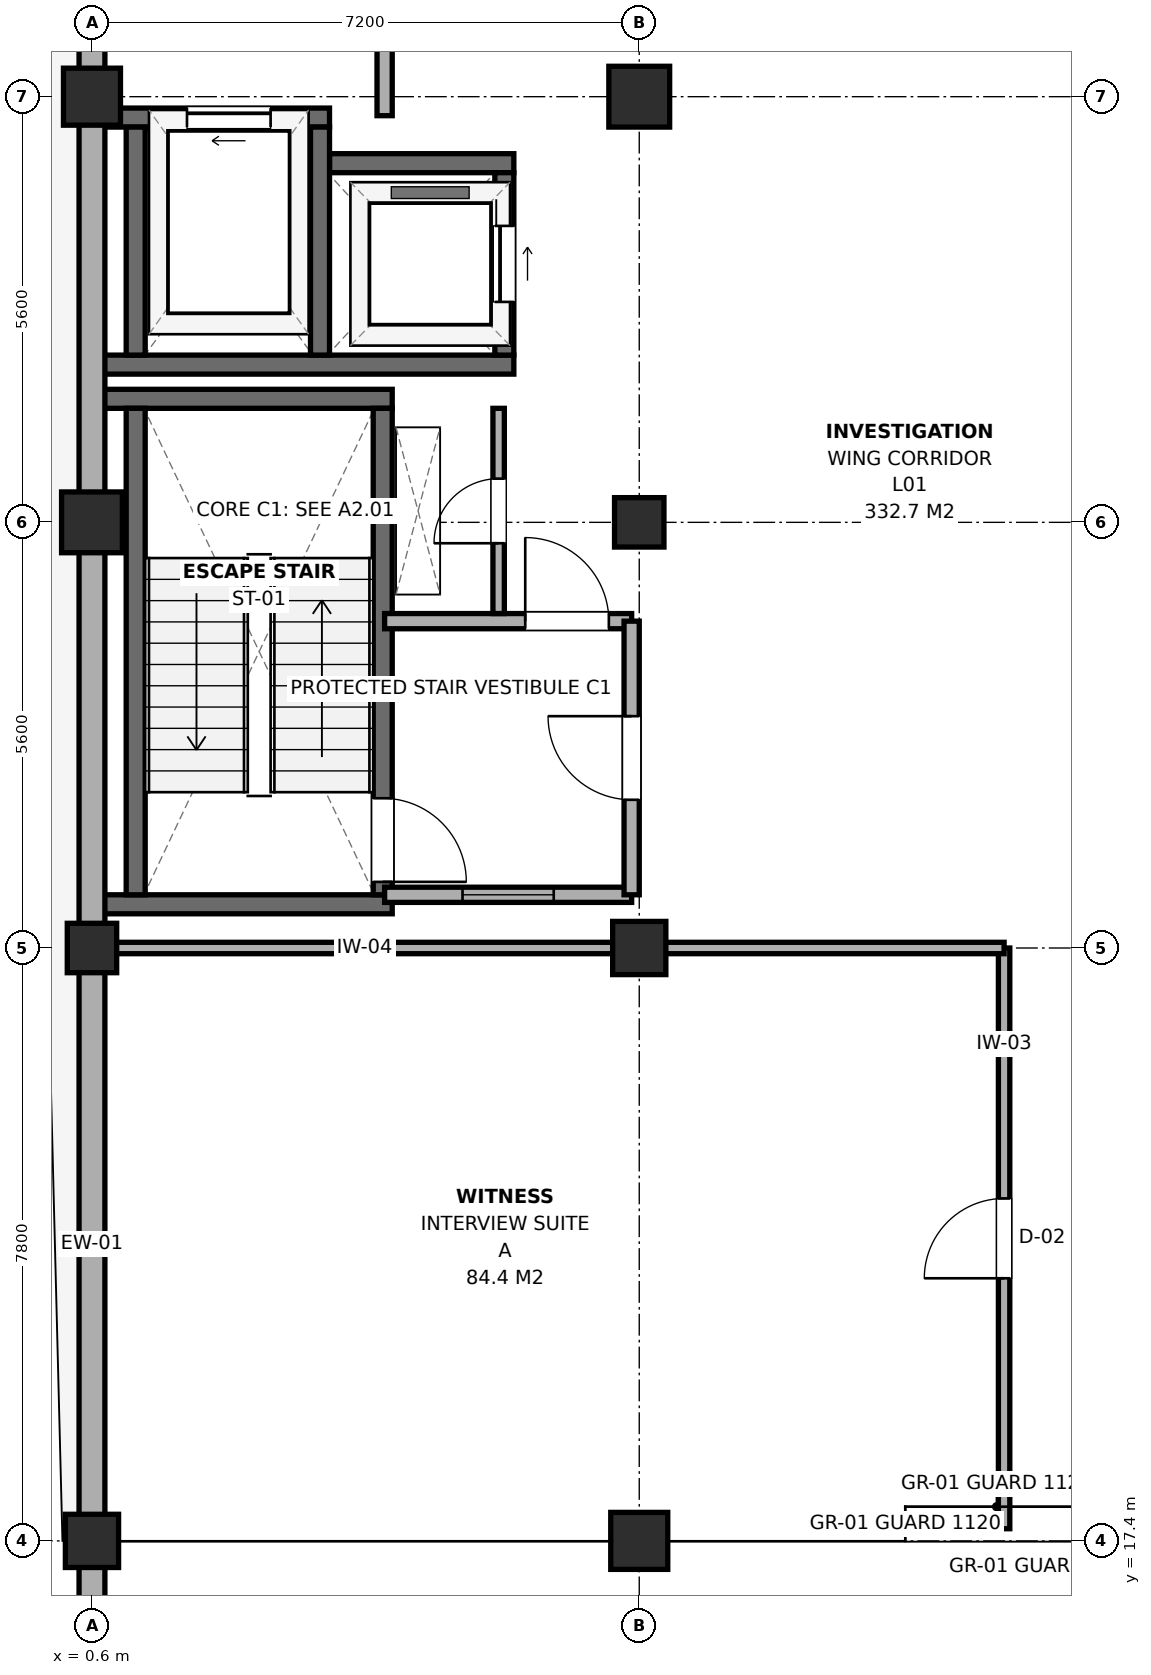
"""IFC4 building model, lengths in metres.
Left out: names, types, materials, properties, quantities, classifications, styles, units other than length and angle.
Written with IfcOpenShell. Run it as: python <this file> out.ifc"""

import sys

from ifc_helpers import new_model, si_unit, direction, frame, frame_2d, origin, origin_2d, place, context, subcontext, project, spatial, rectangle, extrude, element, fill, save


model = new_model("IFC4")
c1 = context("Model", 3, precision=1e-05, world=origin(), true_north=direction((0.0, 1.0)))
c2 = subcontext(c1, "Body", "Model", "MODEL_VIEW")
j1 = project(units=[si_unit("LENGTHUNIT", "METRE"), si_unit("PLANEANGLEUNIT", "RADIAN")], contexts=[c1])
p1 = place(None, origin())
s1 = spatial("IfcSite", under=j1, at=p1, CompositionType="ELEMENT")
p2 = place(p1, origin())
s2 = spatial("IfcBuilding", under=s1, at=p2, CompositionType="ELEMENT")
p3 = place(p2, frame((0.0, 0.0, 4.8)))
s3 = spatial("IfcBuildingStorey", under=s2, at=p3, CompositionType="ELEMENT", Elevation=4.8)
p4 = place(p3, frame((0.6, 17.4, 0.0), z_axis=(0.0, 0.0, 1.0), x_axis=(1.0, 0.0, 0.0)))
e1 = element("IfcColumn", 1, at=p4, inside=s3, PredefinedType="COLUMN", context=c2, shape_type="SweptSolid", body=[
    extrude(rectangle(XDim=0.7, YDim=0.7, at=origin_2d()), origin(), (0.0, 0.0, 1.0), 4.2),
])
p5 = place(p3, frame((0.6, 25.2, 0.0), z_axis=(0.0, 0.0, 1.0), x_axis=(1.0, 0.0, 0.0)))
e2 = element("IfcColumn", 2, at=p5, inside=s3, PredefinedType="COLUMN", context=c2, shape_type="SweptSolid", body=[
    extrude(rectangle(XDim=0.65, YDim=0.65, at=origin_2d()), origin(), (0.0, 0.0, 1.0), 4.2),
])
p6 = place(p3, frame((0.6, 30.8, 0.0), z_axis=(0.0, 0.0, 1.0), x_axis=(1.0, 0.0, 0.0)))
e3 = element("IfcColumn", 3, at=p6, inside=s3, PredefinedType="COLUMN", context=c2, shape_type="SweptSolid", body=[
    extrude(rectangle(XDim=0.8, YDim=0.8, at=origin_2d()), origin(), (0.0, 0.0, 1.0), 4.2),
])
for number, where, z_axis, x_axis in (
    (4, (0.6, 36.4, 0.0), (0.0, 0.0, 1.0), (1.0, 0.0, 0.0)),
    (5, (7.8, 17.4, 0.0), (0.0, 0.0, 1.0), (1.0, 0.0, 0.0)),
):
    element("IfcColumn", number, at=place(p3, frame(where, z_axis=z_axis, x_axis=x_axis)), inside=s3, PredefinedType="COLUMN", context=c2, shape_type="SweptSolid", body=[
        extrude(rectangle(XDim=0.75, YDim=0.75, at=origin_2d()), origin(), (0.0, 0.0, 1.0), 4.2),
    ])
p7 = place(p3, frame((7.8, 25.2, 0.0), z_axis=(0.0, 0.0, 1.0), x_axis=(1.0, 0.0, 0.0)))
e6 = element("IfcColumn", 6, at=p7, inside=s3, PredefinedType="COLUMN", context=c2, shape_type="SweptSolid", body=[
    extrude(rectangle(XDim=0.7, YDim=0.7, at=origin_2d()), origin(), (0.0, 0.0, 1.0), 4.2),
])
p8 = place(p3, frame((7.8, 30.8, 0.0), z_axis=(0.0, 0.0, 1.0), x_axis=(1.0, 0.0, 0.0)))
e7 = element("IfcColumn", 7, at=p8, inside=s3, PredefinedType="COLUMN", context=c2, shape_type="SweptSolid", body=[
    extrude(rectangle(XDim=0.65, YDim=0.65, at=origin_2d()), origin(), (0.0, 0.0, 1.0), 4.2),
])
p9 = place(p3, frame((7.8, 36.4, 0.0), z_axis=(0.0, 0.0, 1.0), x_axis=(1.0, 0.0, 0.0)))
e8 = element("IfcColumn", 8, at=p9, inside=s3, PredefinedType="COLUMN", context=c2, shape_type="SweptSolid", body=[
    extrude(rectangle(XDim=0.8, YDim=0.8, at=origin_2d()), origin(), (0.0, 0.0, 1.0), 4.2),
])
for number, where, z_axis, x_axis in (
    (9, (0.75, 25.775, 0.0), (0.0, 0.0, 1.0), (1.0, 0.0, 0.0)),
    (10, (0.75, 32.425, 0.0), (0.0, 0.0, 1.0), (1.0, 0.0, 0.0)),
):
    element("IfcWall", number, at=place(p3, frame(where, z_axis=z_axis, x_axis=x_axis)), inside=s3, PredefinedType="SHEAR", context=c2, shape_type="SweptSolid", body=[
        extrude(rectangle(XDim=3.8, YDim=0.25, at=frame_2d((1.9, 0.0))), origin(), (0.0, 0.0, 1.0), 3.98),
    ])
p10 = place(p3, frame((1.175, 25.9, 0.0), z_axis=(0.0, 0.0, 1.0), x_axis=(0.0, 1.0, 0.0)))
e11 = element("IfcWall", 11, at=p10, inside=s3, PredefinedType="SHEAR", context=c2, shape_type="SweptSolid", body=[
    extrude(rectangle(XDim=6.4, YDim=0.25, at=frame_2d((3.2, 0.0))), origin(), (0.0, 0.0, 1.0), 3.98),
])
p11 = place(p3, frame((4.425, 25.9, 0.0), z_axis=(0.0, 0.0, 1.0), x_axis=(0.0, 1.0, 0.0)))
e12 = element("IfcWall", 12, at=p11, inside=s3, PredefinedType="SHEAR", context=c2, shape_type="SweptSolid", body=[
    extrude(rectangle(XDim=6.4, YDim=0.25, at=frame_2d((3.2, 0.0))), origin(), (0.0, 0.0, 1.0), 3.98),
])
p12 = place(p11, frame((0.17, 0.0, 0.0)))
e13 = element("IfcOpeningElement", 13, at=p12, cuts=e12, PredefinedType="OPENING", context=c2, shape_type="SweptSolid", body=[
    extrude(rectangle(XDim=1.1, YDim=2.15, at=frame_2d((0.55, 1.075))), frame((0.0, 0.14, 0.0), z_axis=(0.0, -1.0, 0.0), x_axis=(1.0, 0.0, 0.0)), (0.0, 0.0, 1.0), 0.28),
])
p13 = place(p3, frame((0.75, 32.875, 0.0), z_axis=(0.0, 0.0, 1.0), x_axis=(1.0, 0.0, 0.0)))
e14 = element("IfcWall", 14, at=p13, inside=s3, PredefinedType="SHEAR", context=c2, shape_type="SweptSolid", body=[
    extrude(rectangle(XDim=5.4, YDim=0.25, at=frame_2d((2.7, 0.0))), origin(), (0.0, 0.0, 1.0), 3.98),
])
p14 = place(p3, frame((0.75, 36.125, 0.0), z_axis=(0.0, 0.0, 1.0), x_axis=(1.0, 0.0, 0.0)))
e15 = element("IfcWall", 15, at=p14, inside=s3, PredefinedType="SHEAR", context=c2, shape_type="SweptSolid", body=[
    extrude(rectangle(XDim=2.975, YDim=0.25, at=frame_2d((1.488, 0.0))), origin(), (0.0, 0.0, 1.0), 3.98),
])
p15 = place(p14, frame((1.1, 0.0, 0.0)))
e16 = element("IfcOpeningElement", 16, at=p15, cuts=e15, PredefinedType="OPENING", context=c2, shape_type="SweptSolid", body=[
    extrude(rectangle(XDim=1.1, YDim=2.15, at=frame_2d((0.55, 1.075))), frame((0.0, 0.14, 0.0), z_axis=(0.0, -1.0, 0.0), x_axis=(1.0, 0.0, 0.0)), (0.0, 0.0, 1.0), 0.28),
])
p16 = place(p3, frame((3.725, 35.525, 0.0), z_axis=(0.0, 0.0, 1.0), x_axis=(1.0, 0.0, 0.0)))
e17 = element("IfcWall", 17, at=p16, inside=s3, PredefinedType="SHEAR", context=c2, shape_type="SweptSolid", body=[
    extrude(rectangle(XDim=2.425, YDim=0.25, at=frame_2d((1.212, 0.0))), origin(), (0.0, 0.0, 1.0), 3.98),
])
for number, where, z_axis, x_axis in (
    (18, (1.175, 33.0, 0.0), (0.0, 0.0, 1.0), (0.0, 1.0, 0.0)),
    (19, (3.6, 33.0, 0.0), (0.0, 0.0, 1.0), (0.0, 1.0, 0.0)),
):
    element("IfcWall", number, at=place(p3, frame(where, z_axis=z_axis, x_axis=x_axis)), inside=s3, PredefinedType="SHEAR", context=c2, shape_type="SweptSolid", body=[
        extrude(rectangle(XDim=3.0, YDim=0.25, at=frame_2d((1.5, 0.0))), origin(), (0.0, 0.0, 1.0), 3.98),
    ])
p17 = place(p3, frame((6.025, 33.0, 0.0), z_axis=(0.0, 0.0, 1.0), x_axis=(0.0, 1.0, 0.0)))
e20 = element("IfcWall", 20, at=p17, inside=s3, PredefinedType="SHEAR", context=c2, shape_type="SweptSolid", body=[
    extrude(rectangle(XDim=2.4, YDim=0.25, at=frame_2d((1.2, 0.0))), origin(), (0.0, 0.0, 1.0), 3.98),
])
p18 = place(p17, frame((0.7, 0.0, 0.0)))
e21 = element("IfcOpeningElement", 21, at=p18, cuts=e20, PredefinedType="OPENING", context=c2, shape_type="SweptSolid", body=[
    extrude(rectangle(XDim=1.0, YDim=2.15, at=frame_2d((0.5, 1.075))), frame((0.0, 0.14, 0.0), z_axis=(0.0, -1.0, 0.0), x_axis=(1.0, 0.0, 0.0)), (0.0, 0.0, 1.0), 0.28),
])
p19 = place(p3, frame((0.6, 12.0, 0.0), z_axis=(0.0, 0.0, 1.0), x_axis=(0.0, 1.0, 0.0)))
e22 = element("IfcWall", 22, at=p19, inside=s3, PredefinedType="SOLIDWALL", context=c2, shape_type="SweptSolid", body=[
    extrude(rectangle(XDim=5.57, YDim=0.34, at=frame_2d((2.785, 0.0))), origin(), (0.0, 0.0, 1.0), 3.375),
])
p20 = place(p3, frame((0.6, 17.23, 0.0), z_axis=(0.0, 0.0, 1.0), x_axis=(0.0, 1.0, 0.0)))
e23 = element("IfcWall", 23, at=p20, inside=s3, PredefinedType="SOLIDWALL", context=c2, shape_type="SweptSolid", body=[
    extrude(rectangle(XDim=7.97, YDim=0.34, at=frame_2d((3.985, 0.0))), origin(), (0.0, 0.0, 1.0), 3.375),
])
p21 = place(p3, frame((0.6, 25.2, 0.0), z_axis=(0.0, 0.0, 1.0), x_axis=(0.0, 1.0, 0.0)))
e24 = element("IfcWall", 24, at=p21, inside=s3, PredefinedType="SOLIDWALL", context=c2, shape_type="SweptSolid", body=[
    extrude(rectangle(XDim=5.6, YDim=0.34, at=frame_2d((2.8, 0.0))), origin(), (0.0, 0.0, 1.0), 3.425),
])
p22 = place(p3, frame((0.6, 30.8, 0.0), z_axis=(0.0, 0.0, 1.0), x_axis=(0.0, 1.0, 0.0)))
e25 = element("IfcWall", 25, at=p22, inside=s3, PredefinedType="SOLIDWALL", context=c2, shape_type="SweptSolid", body=[
    extrude(rectangle(XDim=5.6, YDim=0.34, at=frame_2d((2.8, 0.0))), origin(), (0.0, 0.0, 1.0), 3.475),
])
p23 = place(p3, frame((0.6, 36.4, 0.0), z_axis=(0.0, 0.0, 1.0), x_axis=(0.0, 1.0, 0.0)))
e26 = element("IfcWall", 26, at=p23, inside=s3, PredefinedType="SOLIDWALL", context=c2, shape_type="SweptSolid", body=[
    extrude(rectangle(XDim=5.6, YDim=0.34, at=frame_2d((2.8, 0.0))), origin(), (0.0, 0.0, 1.0), 3.525),
])
p24 = place(p23, frame((0.85, 0.0, 0.9)))
e27 = element("IfcOpeningElement", 27, at=p24, cuts=e26, PredefinedType="OPENING", context=c2, shape_type="SweptSolid", body=[
    extrude(rectangle(XDim=2.0, YDim=1.8, at=frame_2d((1.0, 0.9))), frame((0.0, 0.185, 0.0), z_axis=(0.0, -1.0, 0.0), x_axis=(1.0, 0.0, 0.0)), (0.0, 0.0, 1.0), 0.37),
])
p25 = place(p3, frame((4.45, 36.15, 0.0), z_axis=(0.0, 0.0, 1.0), x_axis=(0.0, 1.0, 0.0)))
e28 = element("IfcWall", 28, at=p25, inside=s3, PredefinedType="PARTITIONING", context=c2, shape_type="SweptSolid", body=[
    extrude(rectangle(XDim=3.4, YDim=0.2, at=frame_2d((1.7, 0.0))), origin(), (0.0, 0.0, 1.0), 3.375),
])
p26 = place(p25, frame((1.15, 0.0, 0.0)))
e29 = element("IfcOpeningElement", 29, at=p26, cuts=e28, PredefinedType="OPENING", context=c2, shape_type="SweptSolid", body=[
    extrude(rectangle(XDim=1.1, YDim=2.15, at=frame_2d((0.55, 1.075))), frame((0.0, 0.115, 0.0), z_axis=(0.0, -1.0, 0.0), x_axis=(1.0, 0.0, 0.0)), (0.0, 0.0, 1.0), 0.23),
])
p27 = place(p3, frame((4.45, 25.9, 0.0), z_axis=(0.0, 0.0, 1.0), x_axis=(1.0, 0.0, 0.0)))
e30 = element("IfcWall", 30, at=p27, inside=s3, PredefinedType="PARTITIONING", context=c2, shape_type="SweptSolid", body=[
    extrude(rectangle(XDim=3.25, YDim=0.2, at=frame_2d((1.625, 0.0))), origin(), (0.0, 0.0, 1.0), 3.425),
])
p28 = place(p27, frame((1.025, 0.0, 0.95)))
e31 = element("IfcOpeningElement", 31, at=p28, cuts=e30, PredefinedType="OPENING", context=c2, shape_type="SweptSolid", body=[
    extrude(rectangle(XDim=1.2, YDim=1.5, at=frame_2d((0.6, 0.75))), frame((0.0, 0.115, 0.0), z_axis=(0.0, -1.0, 0.0), x_axis=(1.0, 0.0, 0.0)), (0.0, 0.0, 1.0), 0.23),
])
p29 = place(p3, frame((4.45, 29.5, 0.0), z_axis=(0.0, 0.0, 1.0), x_axis=(1.0, 0.0, 0.0)))
e32 = element("IfcWall", 32, at=p29, inside=s3, PredefinedType="PARTITIONING", context=c2, shape_type="SweptSolid", body=[
    extrude(rectangle(XDim=3.25, YDim=0.2, at=frame_2d((1.625, 0.0))), origin(), (0.0, 0.0, 1.0), 3.425),
])
p30 = place(p29, frame((1.85, 0.0, 0.0)))
e33 = element("IfcOpeningElement", 33, at=p30, cuts=e32, PredefinedType="OPENING", context=c2, shape_type="SweptSolid", body=[
    extrude(rectangle(XDim=1.1, YDim=2.15, at=frame_2d((0.55, 1.075))), frame((0.0, 0.115, 0.0), z_axis=(0.0, -1.0, 0.0), x_axis=(1.0, 0.0, 0.0)), (0.0, 0.0, 1.0), 0.23),
])
p31 = place(p3, frame((7.7, 25.9, 0.0), z_axis=(0.0, 0.0, 1.0), x_axis=(0.0, 1.0, 0.0)))
e34 = element("IfcWall", 34, at=p31, inside=s3, PredefinedType="PARTITIONING", context=c2, shape_type="SweptSolid", body=[
    extrude(rectangle(XDim=3.6, YDim=0.2, at=frame_2d((1.8, 0.0))), origin(), (0.0, 0.0, 1.0), 3.425),
])
p32 = place(p31, frame((1.25, 0.0, 0.0)))
e35 = element("IfcOpeningElement", 35, at=p32, cuts=e34, PredefinedType="OPENING", context=c2, shape_type="SweptSolid", body=[
    extrude(rectangle(XDim=1.1, YDim=2.15, at=frame_2d((0.55, 1.075))), frame((0.0, 0.115, 0.0), z_axis=(0.0, -1.0, 0.0), x_axis=(1.0, 0.0, 0.0)), (0.0, 0.0, 1.0), 0.23),
])
p33 = place(p3, frame((5.95, 29.6, 0.0), z_axis=(0.0, 0.0, 1.0), x_axis=(0.0, 1.0, 0.0)))
e36 = element("IfcWall", 36, at=p33, inside=s3, PredefinedType="PARTITIONING", context=c2, shape_type="SweptSolid", body=[
    extrude(rectangle(XDim=2.7, YDim=0.15, at=frame_2d((1.35, 0.0))), origin(), (0.0, 0.0, 1.0), 3.975),
])
p34 = place(p33, frame((0.925, 0.0, 0.0)))
e37 = element("IfcOpeningElement", 37, at=p34, cuts=e36, PredefinedType="OPENING", context=c2, shape_type="SweptSolid", body=[
    extrude(rectangle(XDim=0.85, YDim=2.1, at=frame_2d((0.425, 1.05))), frame((0.0, 0.09, 0.0), z_axis=(0.0, -1.0, 0.0), x_axis=(1.0, 0.0, 0.0)), (0.0, 0.0, 1.0), 0.18),
])
p35 = place(p3, frame((12.6, 17.56, 0.0), z_axis=(0.0, 0.0, 1.0), x_axis=(0.0, 1.0, 0.0)))
e38 = element("IfcWall", 38, at=p35, inside=s3, PredefinedType="PARTITIONING", context=c2, shape_type="SweptSolid", body=[
    extrude(rectangle(XDim=7.64, YDim=0.15, at=frame_2d((3.82, 0.0))), origin(), (0.0, 0.0, 1.0), 3.525),
])
p36 = place(p35, frame((3.295, 0.0, 0.0)))
e39 = element("IfcOpeningElement", 39, at=p36, cuts=e38, PredefinedType="OPENING", context=c2, shape_type="SweptSolid", body=[
    extrude(rectangle(XDim=1.05, YDim=2.15, at=frame_2d((0.525, 1.075))), frame((0.0, 0.09, 0.0), z_axis=(0.0, -1.0, 0.0), x_axis=(1.0, 0.0, 0.0)), (0.0, 0.0, 1.0), 0.18),
])
p37 = place(p3, frame((0.78, 25.2, 0.0), z_axis=(0.0, 0.0, 1.0), x_axis=(1.0, 0.0, 0.0)))
e40 = element("IfcWall", 40, at=p37, inside=s3, PredefinedType="PARTITIONING", context=c2, shape_type="SweptSolid", body=[
    extrude(rectangle(XDim=11.82, YDim=0.15, at=frame_2d((5.91, 0.0))), origin(), (0.0, 0.0, 1.0), 3.475),
])
p38 = place(p12, frame((1.1, 0.0, 0.0), z_axis=(0.0, 0.0, 1.0), x_axis=(-1.0, 0.0, 0.0)))
e41 = element("IfcDoor", 41, at=p38, inside=s3, OperationType="SINGLE_SWING_RIGHT", PredefinedType="DOOR", context=c2, shape_type="SweptSolid", body=[
    extrude(rectangle(XDim=1.1, YDim=2.15, at=frame_2d((0.55, 1.075))), frame((0.0, 0.025, 0.0), z_axis=(0.0, -1.0, 0.0), x_axis=(1.0, 0.0, 0.0)), (0.0, 0.0, 1.0), 0.05),
])
fill(e13, e41)
p39 = place(p15, origin())
e42 = element("IfcDoor", 42, at=p39, inside=s3, OperationType="SLIDING_TO_LEFT", PredefinedType="DOOR", context=c2, shape_type="SweptSolid", body=[
    extrude(rectangle(XDim=1.1, YDim=2.15, at=frame_2d((0.55, 1.075))), frame((0.0, 0.025, 0.0), z_axis=(0.0, -1.0, 0.0), x_axis=(1.0, 0.0, 0.0)), (0.0, 0.0, 1.0), 0.05),
])
fill(e16, e42)
p40 = place(p18, frame((1.0, 0.0, 0.0), z_axis=(0.0, 0.0, 1.0), x_axis=(-1.0, 0.0, 0.0)))
e43 = element("IfcDoor", 43, at=p40, inside=s3, OperationType="SLIDING_TO_RIGHT", PredefinedType="DOOR", context=c2, shape_type="SweptSolid", body=[
    extrude(rectangle(XDim=1.0, YDim=2.15, at=frame_2d((0.5, 1.075))), frame((0.0, 0.025, 0.0), z_axis=(0.0, -1.0, 0.0), x_axis=(1.0, 0.0, 0.0)), (0.0, 0.0, 1.0), 0.05),
])
fill(e21, e43)
p41 = place(p28, origin())
e44 = element("IfcWindow", 44, at=p41, inside=s3, PartitioningType="SINGLE_PANEL", PredefinedType="WINDOW", context=c2, shape_type="SweptSolid", body=[
    extrude(rectangle(XDim=1.2, YDim=1.5, at=frame_2d((0.6, 0.75))), frame((0.0, 0.03, 0.0), z_axis=(0.0, -1.0, 0.0), x_axis=(1.0, 0.0, 0.0)), (0.0, 0.0, 1.0), 0.06),
])
fill(e31, e44)
p42 = place(p30, origin())
e45 = element("IfcDoor", 45, at=p42, inside=s3, OperationType="SINGLE_SWING_LEFT", PredefinedType="DOOR", context=c2, shape_type="SweptSolid", body=[
    extrude(rectangle(XDim=1.1, YDim=2.15, at=frame_2d((0.55, 1.075))), frame((0.0, 0.025, 0.0), z_axis=(0.0, -1.0, 0.0), x_axis=(1.0, 0.0, 0.0)), (0.0, 0.0, 1.0), 0.05),
])
fill(e33, e45)
p43 = place(p32, origin())
e46 = element("IfcDoor", 46, at=p43, inside=s3, OperationType="SINGLE_SWING_RIGHT", PredefinedType="DOOR", context=c2, shape_type="SweptSolid", body=[
    extrude(rectangle(XDim=1.1, YDim=2.15, at=frame_2d((0.55, 1.075))), frame((0.0, 0.025, 0.0), z_axis=(0.0, -1.0, 0.0), x_axis=(1.0, 0.0, 0.0)), (0.0, 0.0, 1.0), 0.05),
])
fill(e35, e46)
p44 = place(p34, origin())
e47 = element("IfcDoor", 47, at=p44, inside=s3, OperationType="SINGLE_SWING_LEFT", PredefinedType="DOOR", context=c2, shape_type="SweptSolid", body=[
    extrude(rectangle(XDim=0.85, YDim=2.1, at=frame_2d((0.425, 1.05))), frame((0.0, 0.025, 0.0), z_axis=(0.0, -1.0, 0.0), x_axis=(1.0, 0.0, 0.0)), (0.0, 0.0, 1.0), 0.05),
])
fill(e37, e47)
p45 = place(p36, origin())
e48 = element("IfcDoor", 48, at=p45, inside=s3, OperationType="SINGLE_SWING_LEFT", PredefinedType="DOOR", context=c2, shape_type="SweptSolid", body=[
    extrude(rectangle(XDim=1.05, YDim=2.15, at=frame_2d((0.525, 1.075))), frame((0.0, 0.025, 0.0), z_axis=(0.0, -1.0, 0.0), x_axis=(1.0, 0.0, 0.0)), (0.0, 0.0, 1.0), 0.05),
])
fill(e39, e48)
save(model, sys.argv[1])
